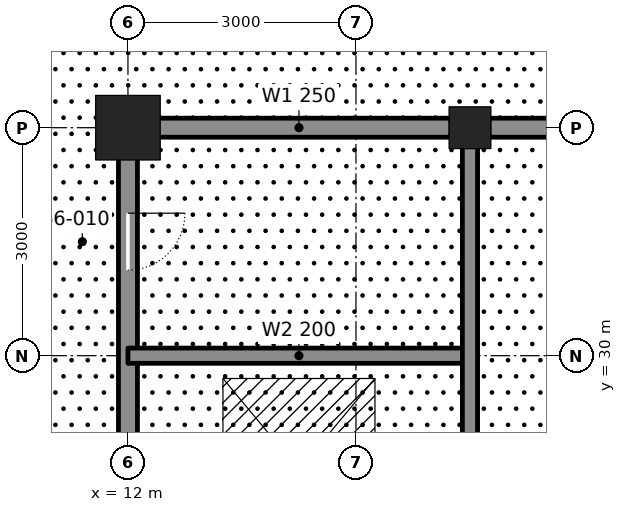
"""IFC4 building model, lengths in metres.
Left out: names, types, materials, properties, quantities, classifications, styles, units other than length and angle.
Written with IfcOpenShell. Run it as: python <this file> out.ifc"""

import sys

from ifc_helpers import new_model, si_unit, direction, frame, frame_2d, origin, origin_2d, place, context, subcontext, project, spatial, rectangle, hollow_rectangle, extrude, element, fill, save


model = new_model("IFC4")
c1 = context("Model", 3, precision=1e-05, world=origin(), true_north=direction((0.0, 1.0)))
c2 = subcontext(c1, "Body", "Model", "MODEL_VIEW")
j1 = project(units=[si_unit("LENGTHUNIT", "METRE"), si_unit("PLANEANGLEUNIT", "RADIAN")], contexts=[c1])
p1 = place(None, origin())
s1 = spatial("IfcSite", under=j1, at=p1, CompositionType="ELEMENT")
p2 = place(p1, origin())
s2 = spatial("IfcBuilding", under=s1, at=p2, CompositionType="ELEMENT")
p3 = place(p2, frame((0.0, 0.0, 251.7)))
s3 = spatial("IfcBuildingStorey", under=s2, at=p3, CompositionType="ELEMENT", Elevation=251.7)
p4 = place(p3, frame((12.0, 33.0, 0.0), z_axis=(0.0, 0.0, 1.0), x_axis=(1.0, 0.0, 0.0)))
e1 = element("IfcColumn", 1, at=p4, inside=s3, PredefinedType="COLUMN", context=c2, shape_type="SweptSolid", body=[
    extrude(hollow_rectangle(XDim=0.85, YDim=0.85, WallThickness=0.085, at=origin_2d()), origin(), (0.0, 0.0, 1.0), 6.0),
])
p5 = place(p3, frame((16.5, 33.0, 0.0), z_axis=(0.0, 0.0, 1.0), x_axis=(1.0, 0.0, 0.0)))
e2 = element("IfcColumn", 2, at=p5, inside=s3, PredefinedType="COLUMN", context=c2, shape_type="SweptSolid", body=[
    extrude(hollow_rectangle(XDim=0.55, YDim=0.55, WallThickness=0.045, at=origin_2d()), origin(), (0.0, 0.0, 1.0), 6.0),
])
p6 = place(p3, frame((12.0, 24.25, 0.0), z_axis=(0.0, 0.0, 1.0), x_axis=(0.0, 1.0, 0.0)))
e3 = element("IfcWall", 3, at=p6, inside=s3, PredefinedType="SOLIDWALL", context=c2, shape_type="SweptSolid", body=[
    extrude(rectangle(XDim=8.5, YDim=0.25, at=frame_2d((4.25, 0.0))), origin(), (0.0, 0.0, 1.0), 4.913),
])
p7 = place(p6, frame((0.65, 0.0, 0.0)))
e4 = element("IfcOpeningElement", 4, at=p7, cuts=e3, PredefinedType="OPENING", context=c2, shape_type="SweptSolid", body=[
    extrude(rectangle(XDim=1.2, YDim=2.1, at=frame_2d((0.6, 1.05))), frame((0.0, 0.135, 0.0), z_axis=(0.0, -1.0, 0.0), x_axis=(1.0, 0.0, 0.0)), (0.0, 0.0, 1.0), 0.27),
])
p8 = place(p6, frame((6.875, 0.0, 0.0)))
e5 = element("IfcOpeningElement", 5, at=p8, cuts=e3, PredefinedType="OPENING", context=c2, shape_type="SweptSolid", body=[
    extrude(rectangle(XDim=0.75, YDim=2.1, at=frame_2d((0.375, 1.05))), frame((0.0, 0.135, 0.0), z_axis=(0.0, -1.0, 0.0), x_axis=(1.0, 0.0, 0.0)), (0.0, 0.0, 1.0), 0.27),
])
p9 = place(p3, frame((12.0, 30.0, 0.0), z_axis=(0.0, 0.0, 1.0), x_axis=(1.0, 0.0, 0.0)))
e6 = element("IfcWall", 6, at=p9, inside=s3, PredefinedType="SOLIDWALL", context=c2, shape_type="SweptSolid", body=[
    extrude(rectangle(XDim=4.5, YDim=0.2, at=frame_2d((2.25, 0.0))), origin(), (0.0, 0.0, 1.0), 5.84),
])
p10 = place(p3, frame((12.25, 33.0, 0.0), z_axis=(0.0, 0.0, 1.0), x_axis=(1.0, 0.0, 0.0)))
e7 = element("IfcWall", 7, at=p10, inside=s3, PredefinedType="SOLIDWALL", context=c2, shape_type="SweptSolid", body=[
    extrude(rectangle(XDim=4.0, YDim=0.25, at=frame_2d((2.0, 0.0))), origin(), (0.0, 0.0, 1.0), 4.981),
])
p11 = place(p3, frame((16.75, 33.0, 0.0), z_axis=(0.0, 0.0, 1.0), x_axis=(1.0, 0.0, 0.0)))
e8 = element("IfcWall", 8, at=p11, inside=s3, PredefinedType="SOLIDWALL", context=c2, shape_type="SweptSolid", body=[
    extrude(rectangle(XDim=2.5, YDim=0.25, at=frame_2d((1.25, 0.0))), origin(), (0.0, 0.0, 1.0), 4.981),
])
p12 = place(p3, frame((16.5, 24.25, 0.0), z_axis=(0.0, 0.0, 1.0), x_axis=(0.0, 1.0, 0.0)))
e9 = element("IfcWall", 9, at=p12, inside=s3, PredefinedType="SOLIDWALL", context=c2, shape_type="SweptSolid", body=[
    extrude(rectangle(XDim=8.5, YDim=0.2, at=frame_2d((4.25, 0.0))), origin(), (0.0, 0.0, 1.0), 4.913),
])
p13 = place(p8, frame((0.75, 0.0, 0.0), z_axis=(0.0, 0.0, 1.0), x_axis=(-1.0, 0.0, 0.0)))
e10 = element("IfcDoor", 10, at=p13, inside=s3, OperationType="SINGLE_SWING_LEFT", PredefinedType="DOOR", context=c2, shape_type="SweptSolid", body=[
    extrude(rectangle(XDim=0.75, YDim=2.1, at=frame_2d((0.375, 1.05))), frame((0.0, 0.025, 0.0), z_axis=(0.0, -1.0, 0.0), x_axis=(1.0, 0.0, 0.0)), (0.0, 0.0, 1.0), 0.05),
])
fill(e5, e10)
save(model, sys.argv[1])
